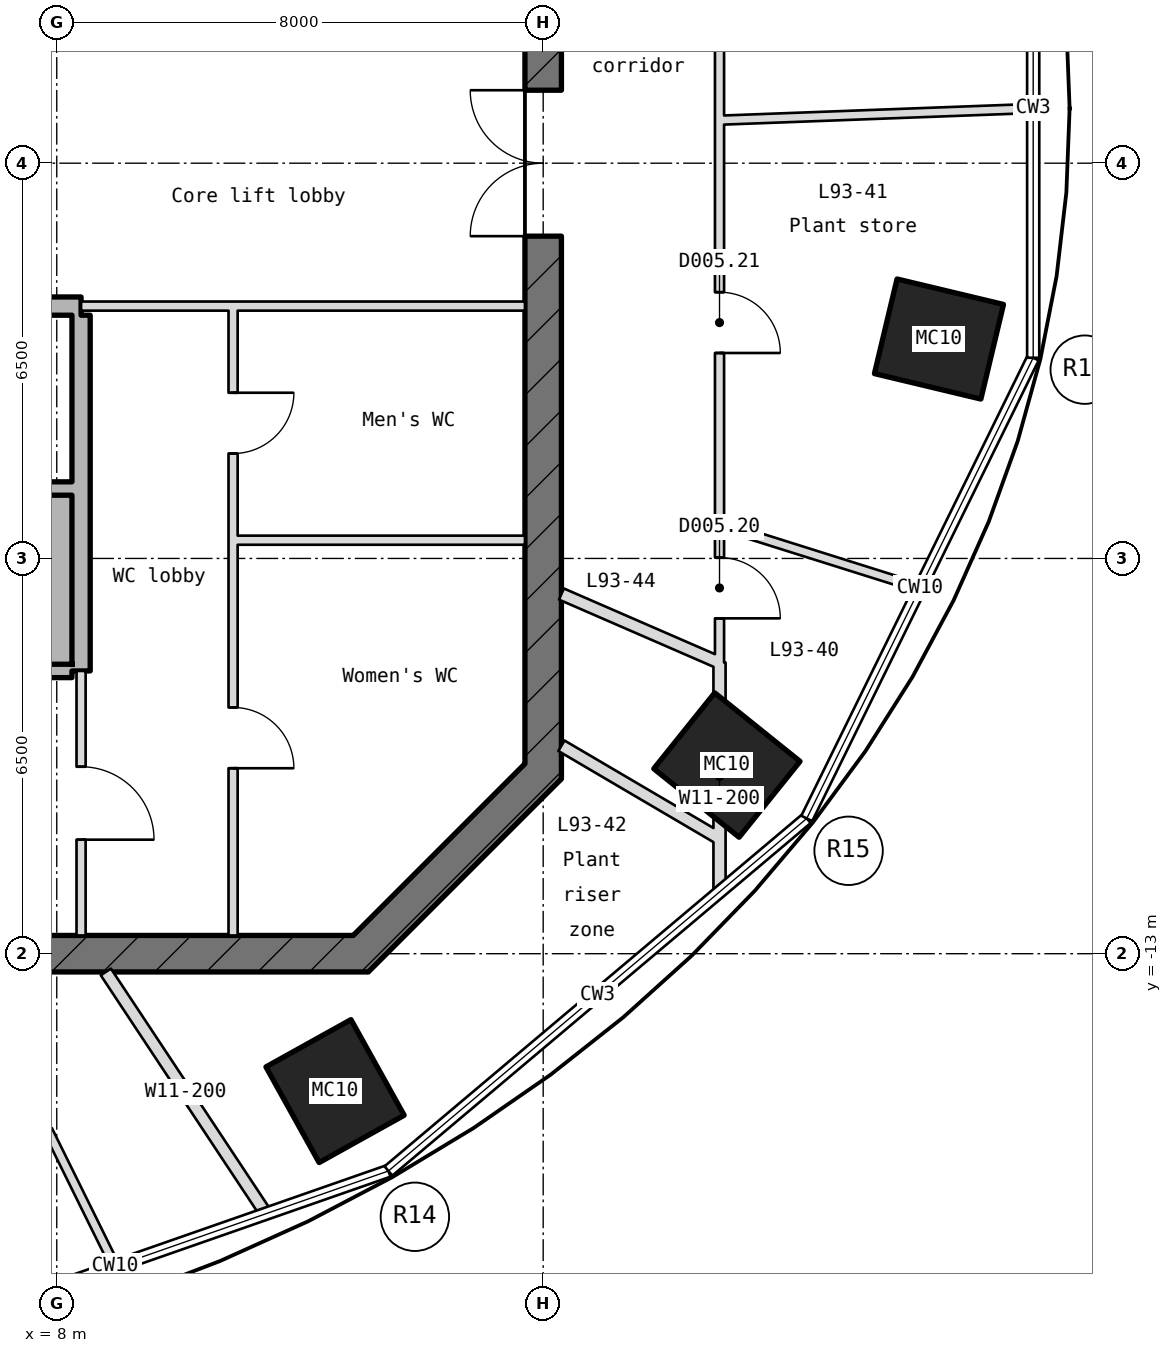
"""IFC4 building model, lengths in metres.
Left out: names, types, materials, properties, quantities, classifications, styles, units other than length and angle.
Written with IfcOpenShell. Run it as: python <this file> out.ifc"""

import sys

from ifc_helpers import new_model, si_unit, direction, frame, frame_2d, origin, origin_2d, place, context, subcontext, project, spatial, rectangle, hollow_rectangle, extrude, element, fill, save


model = new_model("IFC4")
c1 = context("Model", 3, precision=1e-05, world=origin(), true_north=direction((0.0, 1.0)))
c2 = subcontext(c1, "Body", "Model", "MODEL_VIEW")
j1 = project(units=[si_unit("LENGTHUNIT", "METRE"), si_unit("PLANEANGLEUNIT", "RADIAN")], contexts=[c1])
p1 = place(None, origin())
s1 = spatial("IfcSite", under=j1, at=p1, CompositionType="ELEMENT")
p2 = place(p1, origin())
s2 = spatial("IfcBuilding", under=s1, at=p2, CompositionType="ELEMENT")
p3 = place(p2, frame((0.0, 0.0, 413.55)))
s3 = spatial("IfcBuildingStorey", under=s2, at=p3, CompositionType="ELEMENT", Elevation=413.55)
for number, where, z_axis, x_axis in (
    (1, (12.577, -15.26, -0.2), (0.0, 0.0, 1.0), (-0.874, -0.486, 0.0)),
    (2, (19.021, -9.897, -0.2), (0.0, 0.0, 1.0), (-0.626, -0.78, 0.0)),
    (3, (22.509, -2.892, -0.2), (0.0, 0.0, 1.0), (-0.233, -0.973, 0.0)),
):
    element("IfcColumn", number, at=place(p3, frame(where, z_axis=z_axis, x_axis=x_axis)), inside=s3, PredefinedType="COLUMN", context=c2, shape_type="SweptSolid", body=[
        extrude(hollow_rectangle(XDim=1.6, YDim=1.8, WallThickness=0.045, at=origin_2d()), origin(), (0.0, 0.0, 1.0), 5.0),
    ])
p4 = place(p3, frame((12.912, -13.088, -0.2), z_axis=(0.0, 0.0, 1.0), x_axis=(0.707106781187, 0.707106781187, 0.0)))
e4 = element("IfcWall", 4, at=p4, inside=s3, PredefinedType="SHEAR", context=c2, shape_type="SweptSolid", body=[
    extrude(rectangle(XDim=4.491, YDim=0.6, at=frame_2d((2.246, 0.0))), origin(), (0.0, 0.0, 1.0), 5.0),
])
p5 = place(p3, frame((16.0, -10.124, -0.2), z_axis=(0.0, 0.0, 1.0), x_axis=(0.0, 1.0, 0.0)))
e5 = element("IfcWall", 5, at=p5, inside=s3, PredefinedType="SHEAR", context=c2, shape_type="SweptSolid", body=[
    extrude(rectangle(XDim=20.249, YDim=0.6, at=frame_2d((10.124, 0.0))), origin(), (0.0, 0.0, 1.0), 5.0),
])
p6 = place(p5, frame((8.924, 0.0, 0.2)))
e6 = element("IfcOpeningElement", 6, at=p6, cuts=e5, PredefinedType="OPENING", context=c2, shape_type="SweptSolid", body=[
    extrude(rectangle(XDim=2.4, YDim=2.1, at=frame_2d((1.2, 1.05))), frame((0.0, 0.31, 0.0), z_axis=(0.0, -1.0, 0.0), x_axis=(1.0, 0.0, 0.0)), (0.0, 0.0, 1.0), 0.62),
])
p7 = place(p5, frame((13.524, 0.0, 0.2)))
e7 = element("IfcOpeningElement", 7, at=p7, cuts=e5, PredefinedType="OPENING", context=c2, shape_type="SweptSolid", body=[
    extrude(rectangle(XDim=1.2, YDim=2.1, at=frame_2d((0.6, 1.05))), frame((0.0, 0.31, 0.0), z_axis=(0.0, -1.0, 0.0), x_axis=(1.0, 0.0, 0.0)), (0.0, 0.0, 1.0), 0.62),
])
p8 = place(p3, frame((-13.124, -13.0, -0.2), z_axis=(0.0, 0.0, 1.0), x_axis=(1.0, 0.0, 0.0)))
e8 = element("IfcWall", 8, at=p8, inside=s3, PredefinedType="SHEAR", context=c2, shape_type="SweptSolid", body=[
    extrude(rectangle(XDim=26.249, YDim=0.6, at=frame_2d((13.124, 0.0))), origin(), (0.0, 0.0, 1.0), 5.0),
])
p9 = place(p8, frame((2.824, 0.0, 0.2)))
e9 = element("IfcOpeningElement", 9, at=p9, cuts=e8, PredefinedType="OPENING", context=c2, shape_type="SweptSolid", body=[
    extrude(rectangle(XDim=1.2, YDim=2.1, at=frame_2d((0.6, 1.05))), frame((0.0, 0.31, 0.0), z_axis=(0.0, -1.0, 0.0), x_axis=(1.0, 0.0, 0.0)), (0.0, 0.0, 1.0), 0.62),
])
p10 = place(p8, frame((6.824, 0.0, 0.2)))
e10 = element("IfcOpeningElement", 10, at=p10, cuts=e8, PredefinedType="OPENING", context=c2, shape_type="SweptSolid", body=[
    extrude(rectangle(XDim=1.4, YDim=2.1, at=frame_2d((0.7, 1.05))), frame((0.0, 0.31, 0.0), z_axis=(0.0, -1.0, 0.0), x_axis=(1.0, 0.0, 0.0)), (0.0, 0.0, 1.0), 0.62),
])
p11 = place(p8, frame((15.424, 0.0, 0.2)))
e11 = element("IfcOpeningElement", 11, at=p11, cuts=e8, PredefinedType="OPENING", context=c2, shape_type="SweptSolid", body=[
    extrude(rectangle(XDim=1.4, YDim=2.1, at=frame_2d((0.7, 1.05))), frame((0.0, 0.31, 0.0), z_axis=(0.0, -1.0, 0.0), x_axis=(1.0, 0.0, 0.0)), (0.0, 0.0, 1.0), 0.62),
])
p12 = place(p3, frame((-2.69, -8.35, 0.0), z_axis=(0.0, 0.0, 1.0), x_axis=(1.0, 0.0, 0.0)))
e12 = element("IfcWall", 12, at=p12, inside=s3, PredefinedType="STANDARD", context=c2, shape_type="SweptSolid", body=[
    extrude(rectangle(XDim=10.94, YDim=0.22, at=frame_2d((5.47, 0.0))), origin(), (0.0, 0.0, 1.0), 4.8),
])
p13 = place(p12, frame((0.74, 0.0, 0.0)))
e13 = element("IfcOpeningElement", 13, at=p13, cuts=e12, PredefinedType="OPENING", context=c2, shape_type="SweptSolid", body=[
    extrude(rectangle(XDim=1.1, YDim=2.1, at=frame_2d((0.55, 1.05))), frame((0.0, 0.12, 0.0), z_axis=(0.0, -1.0, 0.0), x_axis=(1.0, 0.0, 0.0)), (0.0, 0.0, 1.0), 0.24),
])
p14 = place(p12, frame((3.54, 0.0, 0.0)))
e14 = element("IfcOpeningElement", 14, at=p14, cuts=e12, PredefinedType="OPENING", context=c2, shape_type="SweptSolid", body=[
    extrude(rectangle(XDim=1.1, YDim=2.1, at=frame_2d((0.55, 1.05))), frame((0.0, 0.12, 0.0), z_axis=(0.0, -1.0, 0.0), x_axis=(1.0, 0.0, 0.0)), (0.0, 0.0, 1.0), 0.24),
])
p15 = place(p3, frame((10.975, -6.2, 0.0), z_axis=(0.0, 0.0, 1.0), x_axis=(1.0, 0.0, 0.0)))
e15 = element("IfcWall", 15, at=p15, inside=s3, PredefinedType="PARTITIONING", context=c2, shape_type="SweptSolid", body=[
    extrude(rectangle(XDim=4.725, YDim=0.15, at=frame_2d((2.362, 0.0))), origin(), (0.0, 0.0, 1.0), 4.8),
])
p16 = place(p3, frame((-8.25, -5.35, 0.0), z_axis=(0.0, 0.0, 1.0), x_axis=(1.0, 0.0, 0.0)))
e16 = element("IfcWall", 16, at=p16, inside=s3, PredefinedType="STANDARD", context=c2, shape_type="SweptSolid", body=[
    extrude(rectangle(XDim=16.5, YDim=0.22, at=frame_2d((8.25, 0.0))), origin(), (0.0, 0.0, 1.0), 4.8),
])
p17 = place(p3, frame((-8.4, -2.35, -0.2), z_axis=(0.0, 0.0, 1.0), x_axis=(1.0, 0.0, 0.0)))
e17 = element("IfcWall", 17, at=p17, inside=s3, PredefinedType="SHEAR", context=c2, shape_type="SweptSolid", body=[
    extrude(rectangle(XDim=16.8, YDim=0.3, at=frame_2d((8.4, 0.0))), origin(), (0.0, 0.0, 1.0), 5.0),
])
p18 = place(p17, frame((0.9, 0.0, 0.2)))
e18 = element("IfcOpeningElement", 18, at=p18, cuts=e17, PredefinedType="OPENING", context=c2, shape_type="SweptSolid", body=[
    extrude(rectangle(XDim=1.0, YDim=2.1, at=frame_2d((0.5, 1.05))), frame((0.0, 0.16, 0.0), z_axis=(0.0, -1.0, 0.0), x_axis=(1.0, 0.0, 0.0)), (0.0, 0.0, 1.0), 0.32),
])
p19 = place(p17, frame((14.9, 0.0, 0.2)))
e19 = element("IfcOpeningElement", 19, at=p19, cuts=e17, PredefinedType="OPENING", context=c2, shape_type="SweptSolid", body=[
    extrude(rectangle(XDim=1.0, YDim=2.1, at=frame_2d((0.5, 1.05))), frame((0.0, 0.16, 0.0), z_axis=(0.0, -1.0, 0.0), x_axis=(1.0, 0.0, 0.0)), (0.0, 0.0, 1.0), 0.32),
])
p20 = place(p3, frame((8.4, -2.35, 0.0), z_axis=(0.0, 0.0, 1.0), x_axis=(1.0, 0.0, 0.0)))
e20 = element("IfcWall", 20, at=p20, inside=s3, PredefinedType="PARTITIONING", context=c2, shape_type="SweptSolid", body=[
    extrude(rectangle(XDim=7.3, YDim=0.15, at=frame_2d((3.65, 0.0))), origin(), (0.0, 0.0, 1.0), 4.8),
])
p21 = place(p3, frame((8.4, -12.7, 0.0), z_axis=(0.0, 0.0, 1.0), x_axis=(0.0, 1.0, 0.0)))
e21 = element("IfcWall", 21, at=p21, inside=s3, PredefinedType="PARTITIONING", context=c2, shape_type="SweptSolid", body=[
    extrude(rectangle(XDim=4.35, YDim=0.15, at=frame_2d((2.175, 0.0))), origin(), (0.0, 0.0, 1.0), 4.8),
])
p22 = place(p21, frame((1.575, 0.0, 0.0)))
e22 = element("IfcOpeningElement", 22, at=p22, cuts=e21, PredefinedType="OPENING", context=c2, shape_type="SweptSolid", body=[
    extrude(rectangle(XDim=1.2, YDim=2.1, at=frame_2d((0.6, 1.05))), frame((0.0, 0.085, 0.0), z_axis=(0.0, -1.0, 0.0), x_axis=(1.0, 0.0, 0.0)), (0.0, 0.0, 1.0), 0.17),
])
p23 = place(p3, frame((8.4, -8.35, -0.2), z_axis=(0.0, 0.0, 1.0), x_axis=(0.0, 1.0, 0.0)))
e23 = element("IfcWall", 23, at=p23, inside=s3, PredefinedType="SHEAR", context=c2, shape_type="SweptSolid", body=[
    extrude(rectangle(XDim=5.85, YDim=0.3, at=frame_2d((2.925, 0.0))), origin(), (0.0, 0.0, 1.0), 5.0),
])
p24 = place(p3, frame((10.9, -12.7, 0.0), z_axis=(0.0, 0.0, 1.0), x_axis=(0.0, 1.0, 0.0)))
e24 = element("IfcWall", 24, at=p24, inside=s3, PredefinedType="PARTITIONING", context=c2, shape_type="SweptSolid", body=[
    extrude(rectangle(XDim=10.275, YDim=0.15, at=frame_2d((5.137, 0.0))), origin(), (0.0, 0.0, 1.0), 4.8),
])
p25 = place(p24, frame((7.925, 0.0, 0.0)))
e25 = element("IfcOpeningElement", 25, at=p25, cuts=e24, PredefinedType="OPENING", context=c2, shape_type="SweptSolid", body=[
    extrude(rectangle(XDim=1.0, YDim=2.1, at=frame_2d((0.5, 1.05))), frame((0.0, 0.085, 0.0), z_axis=(0.0, -1.0, 0.0), x_axis=(1.0, 0.0, 0.0)), (0.0, 0.0, 1.0), 0.17),
])
p26 = place(p24, frame((2.75, 0.0, 0.0)))
e26 = element("IfcOpeningElement", 26, at=p26, cuts=e24, PredefinedType="OPENING", context=c2, shape_type="SweptSolid", body=[
    extrude(rectangle(XDim=1.0, YDim=2.1, at=frame_2d((0.5, 1.05))), frame((0.0, 0.085, 0.0), z_axis=(0.0, -1.0, 0.0), x_axis=(1.0, 0.0, 0.0)), (0.0, 0.0, 1.0), 0.17),
])
p27 = place(p3, frame((18.9, 0.707, 0.0), z_axis=(0.0, 0.0, 1.0), x_axis=(0.999299991519, 0.037410251951, 0.0)))
e27 = element("IfcWall", 27, at=p27, inside=s3, PredefinedType="PARTITIONING", context=c2, shape_type="SweptSolid", body=[
    extrude(rectangle(XDim=5.143, YDim=0.15, at=frame_2d((2.571, 0.0))), origin(), (0.0, 0.0, 1.0), 4.8),
])
p28 = place(p3, frame((18.9, -8.216, 0.0), z_axis=(0.0, 0.0, 1.0), x_axis=(0.0, 1.0, 0.0)))
e28 = element("IfcWall", 28, at=p28, inside=s3, PredefinedType="PARTITIONING", context=c2, shape_type="SweptSolid", body=[
    extrude(rectangle(XDim=19.417, YDim=0.15, at=frame_2d((9.708, 0.0))), origin(), (0.0, 0.0, 1.0), 4.8),
])
p29 = place(p28, frame((13.67, 0.0, 0.0)))
e29 = element("IfcOpeningElement", 29, at=p29, cuts=e28, PredefinedType="OPENING", context=c2, shape_type="SweptSolid", body=[
    extrude(rectangle(XDim=1.0, YDim=2.1, at=frame_2d((0.5, 1.05))), frame((0.0, 0.085, 0.0), z_axis=(0.0, -1.0, 0.0), x_axis=(1.0, 0.0, 0.0)), (0.0, 0.0, 1.0), 0.17),
])
p30 = place(p28, frame((0.73, 0.0, 0.0)))
e30 = element("IfcOpeningElement", 30, at=p30, cuts=e28, PredefinedType="OPENING", context=c2, shape_type="SweptSolid", body=[
    extrude(rectangle(XDim=1.0, YDim=2.1, at=frame_2d((0.5, 1.05))), frame((0.0, 0.085, 0.0), z_axis=(0.0, -1.0, 0.0), x_axis=(1.0, 0.0, 0.0)), (0.0, 0.0, 1.0), 0.17),
])
p31 = place(p28, frame((5.094, 0.0, 0.0)))
e31 = element("IfcOpeningElement", 31, at=p31, cuts=e28, PredefinedType="OPENING", context=c2, shape_type="SweptSolid", body=[
    extrude(rectangle(XDim=1.0, YDim=2.1, at=frame_2d((0.5, 1.05))), frame((0.0, 0.085, 0.0), z_axis=(0.0, -1.0, 0.0), x_axis=(1.0, 0.0, 0.0)), (0.0, 0.0, 1.0), 0.17),
])
p32 = place(p3, frame((8.951, -18.124, 0.0), z_axis=(0.0, 0.0, 1.0), x_axis=(-0.44283891536, 0.896601190632, 0.0)))
e32 = element("IfcWall", 32, at=p32, inside=s3, PredefinedType="PARTITIONING", context=c2, shape_type="SweptSolid", body=[
    extrude(rectangle(XDim=2.481, YDim=0.15, at=frame_2d((1.24, 0.0))), origin(), (0.0, 0.0, 1.0), 4.8),
])
p33 = place(p3, frame((22.178, -6.981, 0.0), z_axis=(0.0, 0.0, 1.0), x_axis=(-0.95386356969, 0.300240387719, 0.0)))
e33 = element("IfcWall", 33, at=p33, inside=s3, PredefinedType="PARTITIONING", context=c2, shape_type="SweptSolid", body=[
    extrude(rectangle(XDim=3.436, YDim=0.15, at=frame_2d((1.718, 0.0))), origin(), (0.0, 0.0, 1.0), 4.8),
])
p34 = place(p3, frame((18.9, -11.958, 0.0), z_axis=(0.0, 0.0, 1.0), x_axis=(0.0, 1.0, 0.0)))
e34 = element("IfcWall", 34, at=p34, inside=s3, PredefinedType="PARTITIONING", context=c2, shape_type="SweptSolid", body=[
    extrude(rectangle(XDim=3.746, YDim=0.2, at=frame_2d((1.873, 0.0))), origin(), (0.0, 0.0, 1.0), 4.8),
])
p35 = place(p3, frame((11.429, -17.259, 0.0), z_axis=(0.0, 0.0, 1.0), x_axis=(-0.55212294176, 0.833762710357, 0.0)))
e35 = element("IfcWall", 35, at=p35, inside=s3, PredefinedType="PARTITIONING", context=c2, shape_type="SweptSolid", body=[
    extrude(rectangle(XDim=4.749, YDim=0.2, at=frame_2d((2.374, 0.0))), origin(), (0.0, 0.0, 1.0), 4.8),
])
p36 = place(p3, frame((18.899, -11.107, 0.0), z_axis=(0.0, 0.0, 1.0), x_axis=(-0.862138181782, 0.506673223601, 0.0)))
e36 = element("IfcWall", 36, at=p36, inside=s3, PredefinedType="PARTITIONING", context=c2, shape_type="SweptSolid", body=[
    extrude(rectangle(XDim=3.014, YDim=0.2, at=frame_2d((1.507, 0.0))), origin(), (0.0, 0.0, 1.0), 4.8),
])
p37 = place(p3, frame((18.9, -8.216, 0.0), z_axis=(0.0, 0.0, 1.0), x_axis=(-0.917070056253, 0.398726111414, 0.0)))
e37 = element("IfcWall", 37, at=p37, inside=s3, PredefinedType="PARTITIONING", context=c2, shape_type="SweptSolid", body=[
    extrude(rectangle(XDim=2.835, YDim=0.2, at=frame_2d((1.417, 0.0))), origin(), (0.0, 0.0, 1.0), 4.8),
])
p38 = place(p6, origin())
e38 = element("IfcDoor", 38, at=p38, inside=s3, OperationType="DOUBLE_DOOR_SINGLE_SWING", PredefinedType="DOOR", context=c2, shape_type="SweptSolid", body=[
    extrude(rectangle(XDim=2.4, YDim=2.1, at=frame_2d((1.2, 1.05))), frame((0.0, 0.025, 0.0), z_axis=(0.0, -1.0, 0.0), x_axis=(1.0, 0.0, 0.0)), (0.0, 0.0, 1.0), 0.05),
])
fill(e6, e38)
p39 = place(p22, frame((1.2, 0.0, 0.0), z_axis=(0.0, 0.0, 1.0), x_axis=(-1.0, 0.0, 0.0)))
e39 = element("IfcDoor", 39, at=p39, inside=s3, OperationType="SINGLE_SWING_LEFT", PredefinedType="DOOR", context=c2, shape_type="SweptSolid", body=[
    extrude(rectangle(XDim=1.2, YDim=2.1, at=frame_2d((0.6, 1.05))), frame((0.0, 0.025, 0.0), z_axis=(0.0, -1.0, 0.0), x_axis=(1.0, 0.0, 0.0)), (0.0, 0.0, 1.0), 0.05),
])
fill(e22, e39)
p40 = place(p25, frame((1.0, 0.0, 0.0), z_axis=(0.0, 0.0, 1.0), x_axis=(-1.0, 0.0, 0.0)))
e40 = element("IfcDoor", 40, at=p40, inside=s3, OperationType="SINGLE_SWING_LEFT", PredefinedType="DOOR", context=c2, shape_type="SweptSolid", body=[
    extrude(rectangle(XDim=1.0, YDim=2.1, at=frame_2d((0.5, 1.05))), frame((0.0, 0.025, 0.0), z_axis=(0.0, -1.0, 0.0), x_axis=(1.0, 0.0, 0.0)), (0.0, 0.0, 1.0), 0.05),
])
fill(e25, e40)
p41 = place(p26, frame((1.0, 0.0, 0.0), z_axis=(0.0, 0.0, 1.0), x_axis=(-1.0, 0.0, 0.0)))
e41 = element("IfcDoor", 41, at=p41, inside=s3, OperationType="SINGLE_SWING_LEFT", PredefinedType="DOOR", context=c2, shape_type="SweptSolid", body=[
    extrude(rectangle(XDim=1.0, YDim=2.1, at=frame_2d((0.5, 1.05))), frame((0.0, 0.025, 0.0), z_axis=(0.0, -1.0, 0.0), x_axis=(1.0, 0.0, 0.0)), (0.0, 0.0, 1.0), 0.05),
])
fill(e26, e41)
p42 = place(p30, frame((1.0, 0.0, 0.0), z_axis=(0.0, 0.0, 1.0), x_axis=(-1.0, 0.0, 0.0)))
e42 = element("IfcDoor", 42, at=p42, inside=s3, OperationType="SINGLE_SWING_LEFT", PredefinedType="DOOR", context=c2, shape_type="SweptSolid", body=[
    extrude(rectangle(XDim=1.0, YDim=2.1, at=frame_2d((0.5, 1.05))), frame((0.0, 0.025, 0.0), z_axis=(0.0, -1.0, 0.0), x_axis=(1.0, 0.0, 0.0)), (0.0, 0.0, 1.0), 0.05),
])
fill(e30, e42)
p43 = place(p31, frame((1.0, 0.0, 0.0), z_axis=(0.0, 0.0, 1.0), x_axis=(-1.0, 0.0, 0.0)))
e43 = element("IfcDoor", 43, at=p43, inside=s3, OperationType="SINGLE_SWING_LEFT", PredefinedType="DOOR", context=c2, shape_type="SweptSolid", body=[
    extrude(rectangle(XDim=1.0, YDim=2.1, at=frame_2d((0.5, 1.05))), frame((0.0, 0.025, 0.0), z_axis=(0.0, -1.0, 0.0), x_axis=(1.0, 0.0, 0.0)), (0.0, 0.0, 1.0), 0.05),
])
fill(e31, e43)
save(model, sys.argv[1])
